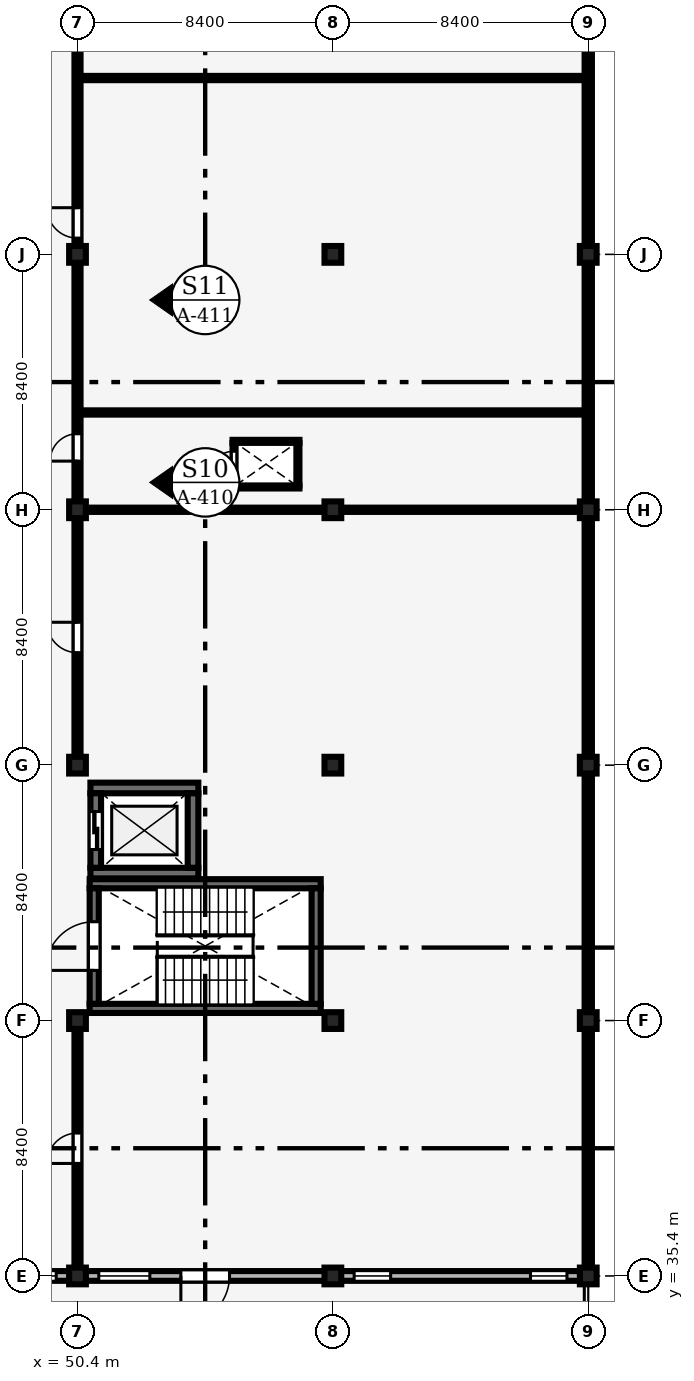
"""IFC4 building model, lengths in metres.
Left out: names, types, materials, properties, quantities, classifications, styles, units other than length and angle.
Written with IfcOpenShell. Run it as: python <this file> out.ifc"""

import sys

from ifc_helpers import new_model, si_unit, direction, frame, frame_2d, origin, origin_2d, place, context, subcontext, project, spatial, rectangle, extrude, element, fill, save


model = new_model("IFC4")
c1 = context("Model", 3, precision=1e-05, world=origin(), true_north=direction((0.0, 1.0)))
c2 = subcontext(c1, "Body", "Model", "MODEL_VIEW")
j1 = project(units=[si_unit("LENGTHUNIT", "METRE"), si_unit("PLANEANGLEUNIT", "RADIAN")], contexts=[c1])
p1 = place(None, origin())
s1 = spatial("IfcSite", under=j1, at=p1, CompositionType="ELEMENT")
p2 = place(p1, origin())
s2 = spatial("IfcBuilding", under=s1, at=p2, CompositionType="ELEMENT")
p3 = place(p2, frame((0.0, 0.0, 9.0)))
s3 = spatial("IfcBuildingStorey", under=s2, at=p3, CompositionType="ELEMENT", Elevation=9.0)
for number, where, z_axis, x_axis in (
    (1, (50.4, 35.4, 0.0), (0.0, 0.0, 1.0), (1.0, 0.0, 0.0)),
    (2, (50.4, 43.8, 0.0), (0.0, 0.0, 1.0), (1.0, 0.0, 0.0)),
    (3, (50.4, 52.2, 0.0), (0.0, 0.0, 1.0), (1.0, 0.0, 0.0)),
    (4, (50.4, 60.6, 0.0), (0.0, 0.0, 1.0), (1.0, 0.0, 0.0)),
    (5, (50.4, 69.0, 0.0), (0.0, 0.0, 1.0), (1.0, 0.0, 0.0)),
    (6, (58.8, 35.4, 0.0), (0.0, 0.0, 1.0), (1.0, 0.0, 0.0)),
    (7, (58.8, 43.8, 0.0), (0.0, 0.0, 1.0), (1.0, 0.0, 0.0)),
    (8, (58.8, 52.2, 0.0), (0.0, 0.0, 1.0), (1.0, 0.0, 0.0)),
    (9, (58.8, 60.6, 0.0), (0.0, 0.0, 1.0), (1.0, 0.0, 0.0)),
    (10, (58.8, 69.0, 0.0), (0.0, 0.0, 1.0), (1.0, 0.0, 0.0)),
    (11, (67.2, 35.4, 0.0), (0.0, 0.0, 1.0), (1.0, 0.0, 0.0)),
    (12, (67.2, 43.8, 0.0), (0.0, 0.0, 1.0), (1.0, 0.0, 0.0)),
    (13, (67.2, 52.2, 0.0), (0.0, 0.0, 1.0), (1.0, 0.0, 0.0)),
    (14, (67.2, 60.6, 0.0), (0.0, 0.0, 1.0), (1.0, 0.0, 0.0)),
    (15, (67.2, 69.0, 0.0), (0.0, 0.0, 1.0), (1.0, 0.0, 0.0)),
):
    element("IfcColumn", number, at=place(p3, frame(where, z_axis=z_axis, x_axis=x_axis)), inside=s3, PredefinedType="COLUMN", context=c2, shape_type="SweptSolid", body=[
        extrude(rectangle(XDim=0.55, YDim=0.55, at=origin_2d()), origin(), (0.0, 0.0, 1.0), 4.2),
    ])
p4 = place(p3, frame((42.25, 35.4, 0.0), z_axis=(0.0, 0.0, 1.0), x_axis=(1.0, 0.0, 0.0)))
e16 = element("IfcWall", 16, at=p4, inside=s3, PredefinedType="SOLIDWALL", context=c2, shape_type="SweptSolid", body=[
    extrude(rectangle(XDim=7.9, YDim=0.32, at=frame_2d((3.95, 0.0))), origin(), (0.0, 0.0, 1.0), 2.96),
])
p5 = place(p4, frame((0.45, 0.0, 0.9)))
e17 = element("IfcOpeningElement", 17, at=p5, cuts=e16, PredefinedType="OPENING", context=c2, shape_type="SweptSolid", body=[
    extrude(rectangle(XDim=1.2, YDim=1.5, at=frame_2d((0.6, 0.75))), frame((0.0, 0.17, 0.0), z_axis=(0.0, -1.0, 0.0), x_axis=(1.0, 0.0, 0.0)), (0.0, 0.0, 1.0), 0.34),
])
p6 = place(p4, frame((6.25, 0.0, 0.9)))
e18 = element("IfcOpeningElement", 18, at=p6, cuts=e16, PredefinedType="OPENING", context=c2, shape_type="SweptSolid", body=[
    extrude(rectangle(XDim=1.2, YDim=1.8, at=frame_2d((0.6, 0.9))), frame((0.0, 0.17, 0.0), z_axis=(0.0, -1.0, 0.0), x_axis=(1.0, 0.0, 0.0)), (0.0, 0.0, 1.0), 0.34),
])
p7 = place(p3, frame((50.65, 35.4, 0.0), z_axis=(0.0, 0.0, 1.0), x_axis=(1.0, 0.0, 0.0)))
e19 = element("IfcWall", 19, at=p7, inside=s3, PredefinedType="SOLIDWALL", context=c2, shape_type="SweptSolid", body=[
    extrude(rectangle(XDim=7.9, YDim=0.32, at=frame_2d((3.95, 0.0))), origin(), (0.0, 0.0, 1.0), 2.91),
])
p8 = place(p7, frame((4.75, 0.0, 0.0), z_axis=(0.0, 0.0, 1.0), x_axis=(-1.0, 0.0, 0.0)))
e20 = element("IfcOpeningElement", 20, at=p8, cuts=e19, PredefinedType="OPENING", context=c2, shape_type="SweptSolid", body=[
    extrude(rectangle(XDim=1.6, YDim=2.3, at=frame_2d((0.8, 1.15))), frame((0.0, 0.17, 0.0), z_axis=(0.0, -1.0, 0.0), x_axis=(1.0, 0.0, 0.0)), (0.0, 0.0, 1.0), 0.34),
])
p9 = place(p7, frame((0.45, 0.0, 0.95)))
e21 = element("IfcOpeningElement", 21, at=p9, cuts=e19, PredefinedType="OPENING", context=c2, shape_type="SweptSolid", body=[
    extrude(rectangle(XDim=1.68, YDim=1.8, at=frame_2d((0.84, 0.9))), frame((0.0, 0.17, 0.0), z_axis=(0.0, -1.0, 0.0), x_axis=(1.0, 0.0, 0.0)), (0.0, 0.0, 1.0), 0.34),
])
p10 = place(p3, frame((59.05, 35.4, 0.0), z_axis=(0.0, 0.0, 1.0), x_axis=(1.0, 0.0, 0.0)))
e22 = element("IfcWall", 22, at=p10, inside=s3, PredefinedType="SOLIDWALL", context=c2, shape_type="SweptSolid", body=[
    extrude(rectangle(XDim=7.9, YDim=0.32, at=frame_2d((3.95, 0.0))), origin(), (0.0, 0.0, 1.0), 2.81),
])
p11 = place(p10, frame((0.45, 0.0, 0.9)))
e23 = element("IfcOpeningElement", 23, at=p11, cuts=e22, PredefinedType="OPENING", context=c2, shape_type="SweptSolid", body=[
    extrude(rectangle(XDim=1.2, YDim=1.5, at=frame_2d((0.6, 0.75))), frame((0.0, 0.17, 0.0), z_axis=(0.0, -1.0, 0.0), x_axis=(1.0, 0.0, 0.0)), (0.0, 0.0, 1.0), 0.34),
])
p12 = place(p10, frame((6.25, 0.0, 0.9)))
e24 = element("IfcOpeningElement", 24, at=p12, cuts=e22, PredefinedType="OPENING", context=c2, shape_type="SweptSolid", body=[
    extrude(rectangle(XDim=1.2, YDim=1.76, at=frame_2d((0.6, 0.88))), frame((0.0, 0.17, 0.0), z_axis=(0.0, -1.0, 0.0), x_axis=(1.0, 0.0, 0.0)), (0.0, 0.0, 1.0), 0.34),
])
p13 = place(p3, frame((67.2, 35.65, 0.0), z_axis=(0.0, 0.0, 1.0), x_axis=(0.0, 1.0, 0.0)))
e25 = element("IfcWall", 25, at=p13, inside=s3, PredefinedType="SOLIDWALL", context=c2, shape_type="SweptSolid", body=[
    extrude(rectangle(XDim=7.9, YDim=0.24, at=frame_2d((3.95, 0.0))), origin(), (0.0, 0.0, 1.0), 1.15),
])
p14 = place(p3, frame((67.2, 44.05, 0.0), z_axis=(0.0, 0.0, 1.0), x_axis=(0.0, 1.0, 0.0)))
e26 = element("IfcWall", 26, at=p14, inside=s3, PredefinedType="SOLIDWALL", context=c2, shape_type="SweptSolid", body=[
    extrude(rectangle(XDim=7.9, YDim=0.24, at=frame_2d((3.95, 0.0))), origin(), (0.0, 0.0, 1.0), 1.15),
])
p15 = place(p3, frame((67.2, 52.45, 0.0), z_axis=(0.0, 0.0, 1.0), x_axis=(0.0, 1.0, 0.0)))
e27 = element("IfcWall", 27, at=p15, inside=s3, PredefinedType="SOLIDWALL", context=c2, shape_type="SweptSolid", body=[
    extrude(rectangle(XDim=7.9, YDim=0.24, at=frame_2d((3.95, 0.0))), origin(), (0.0, 0.0, 1.0), 1.15),
])
for number, where, z_axis, x_axis in (
    (28, (67.2, 60.85, 0.0), (0.0, 0.0, 1.0), (0.0, 1.0, 0.0)),
    (29, (67.2, 69.25, 0.0), (0.0, 0.0, 1.0), (0.0, 1.0, 0.0)),
):
    element("IfcWall", number, at=place(p3, frame(where, z_axis=z_axis, x_axis=x_axis)), inside=s3, PredefinedType="SOLIDWALL", context=c2, shape_type="SweptSolid", body=[
        extrude(rectangle(XDim=7.9, YDim=0.24, at=frame_2d((3.95, 0.0))), origin(), (0.0, 0.0, 1.0), 1.15),
    ])
for number, where, z_axis, x_axis in (
    (30, (50.8, 44.2, 0.0), (0.0, 0.0, 1.0), (1.0, 0.0, 0.0)),
    (31, (50.8, 48.3, 0.0), (0.0, 0.0, 1.0), (1.0, 0.0, 0.0)),
):
    element("IfcWall", number, at=place(p3, frame(where, z_axis=z_axis, x_axis=x_axis)), inside=s3, PredefinedType="SHEAR", context=c2, shape_type="SweptSolid", body=[
        extrude(rectangle(XDim=7.6, YDim=0.3, at=frame_2d((3.8, 0.0))), origin(), (0.0, 0.0, 1.0), 4.025),
    ])
p16 = place(p3, frame((50.95, 44.35, 0.0), z_axis=(0.0, 0.0, 1.0), x_axis=(0.0, 1.0, 0.0)))
e32 = element("IfcWall", 32, at=p16, inside=s3, PredefinedType="SHEAR", context=c2, shape_type="SweptSolid", body=[
    extrude(rectangle(XDim=3.8, YDim=0.3, at=frame_2d((1.9, 0.0))), origin(), (0.0, 0.0, 1.0), 4.025),
])
p17 = place(p16, frame((1.1, 0.0, 0.0)))
e33 = element("IfcOpeningElement", 33, at=p17, cuts=e32, PredefinedType="OPENING", context=c2, shape_type="SweptSolid", body=[
    extrude(rectangle(XDim=1.6, YDim=2.2, at=frame_2d((0.8, 1.1))), frame((0.0, 0.16, 0.0), z_axis=(0.0, -1.0, 0.0), x_axis=(1.0, 0.0, 0.0)), (0.0, 0.0, 1.0), 0.32),
])
p18 = place(p3, frame((58.25, 44.35, 0.0), z_axis=(0.0, 0.0, 1.0), x_axis=(0.0, 1.0, 0.0)))
e34 = element("IfcWall", 34, at=p18, inside=s3, PredefinedType="SHEAR", context=c2, shape_type="SweptSolid", body=[
    extrude(rectangle(XDim=3.8, YDim=0.3, at=frame_2d((1.9, 0.0))), origin(), (0.0, 0.0, 1.0), 4.025),
])
for number, where, z_axis, x_axis in (
    (35, (50.825, 48.65, 0.0), (0.0, 0.0, 1.0), (1.0, 0.0, 0.0)),
    (36, (50.825, 51.45, 0.0), (0.0, 0.0, 1.0), (1.0, 0.0, 0.0)),
):
    element("IfcWall", number, at=place(p3, frame(where, z_axis=z_axis, x_axis=x_axis)), inside=s3, PredefinedType="SHEAR", context=c2, shape_type="SweptSolid", body=[
        extrude(rectangle(XDim=3.55, YDim=0.35, at=frame_2d((1.775, 0.0))), origin(), (0.0, 0.0, 1.0), 3.92),
    ])
p19 = place(p3, frame((51.0, 48.825, 0.0), z_axis=(0.0, 0.0, 1.0), x_axis=(0.0, 1.0, 0.0)))
e37 = element("IfcWall", 37, at=p19, inside=s3, PredefinedType="SHEAR", context=c2, shape_type="SweptSolid", body=[
    extrude(rectangle(XDim=2.45, YDim=0.35, at=frame_2d((1.225, 0.0))), origin(), (0.0, 0.0, 1.0), 3.92),
])
p20 = place(p19, frame((0.6, 0.0, 0.0)))
e38 = element("IfcOpeningElement", 38, at=p20, cuts=e37, PredefinedType="OPENING", context=c2, shape_type="SweptSolid", body=[
    extrude(rectangle(XDim=1.25, YDim=2.25, at=frame_2d((0.625, 1.125))), frame((0.0, 0.185, 0.0), z_axis=(0.0, -1.0, 0.0), x_axis=(1.0, 0.0, 0.0)), (0.0, 0.0, 1.0), 0.37),
])
p21 = place(p3, frame((54.2, 48.825, 0.0), z_axis=(0.0, 0.0, 1.0), x_axis=(0.0, 1.0, 0.0)))
e39 = element("IfcWall", 39, at=p21, inside=s3, PredefinedType="SHEAR", context=c2, shape_type="SweptSolid", body=[
    extrude(rectangle(XDim=2.45, YDim=0.35, at=frame_2d((1.225, 0.0))), origin(), (0.0, 0.0, 1.0), 3.92),
])
for number, where, z_axis, x_axis in (
    (40, (55.5, 61.35, 0.0), (0.0, 0.0, 1.0), (1.0, 0.0, 0.0)),
    (41, (55.5, 62.85, 0.0), (0.0, 0.0, 1.0), (1.0, 0.0, 0.0)),
):
    element("IfcWall", number, at=place(p3, frame(where, z_axis=z_axis, x_axis=x_axis)), inside=s3, PredefinedType="PARTITIONING", context=c2, shape_type="SweptSolid", body=[
        extrude(rectangle(XDim=2.2, YDim=0.1, at=frame_2d((1.1, 0.0))), origin(), (0.0, 0.0, 1.0), 3.9),
    ])
p22 = place(p3, frame((55.55, 61.4, 0.0), z_axis=(0.0, 0.0, 1.0), x_axis=(0.0, 1.0, 0.0)))
e42 = element("IfcWall", 42, at=p22, inside=s3, PredefinedType="PARTITIONING", context=c2, shape_type="SweptSolid", body=[
    extrude(rectangle(XDim=1.4, YDim=0.1, at=frame_2d((0.7, 0.0))), origin(), (0.0, 0.0, 1.0), 3.9),
])
p23 = place(p22, frame((0.275, 0.0, 0.0)))
e43 = element("IfcOpeningElement", 43, at=p23, cuts=e42, PredefinedType="OPENING", context=c2, shape_type="SweptSolid", body=[
    extrude(rectangle(XDim=0.85, YDim=2.05, at=frame_2d((0.425, 1.025))), frame((0.0, 0.06, 0.0), z_axis=(0.0, -1.0, 0.0), x_axis=(1.0, 0.0, 0.0)), (0.0, 0.0, 1.0), 0.12),
])
p24 = place(p3, frame((57.65, 61.4, 0.0), z_axis=(0.0, 0.0, 1.0), x_axis=(0.0, 1.0, 0.0)))
e44 = element("IfcWall", 44, at=p24, inside=s3, PredefinedType="PARTITIONING", context=c2, shape_type="SweptSolid", body=[
    extrude(rectangle(XDim=1.4, YDim=0.1, at=frame_2d((0.7, 0.0))), origin(), (0.0, 0.0, 1.0), 3.9),
])
p25 = place(p3, frame((50.4, 35.565, 0.0), z_axis=(0.0, 0.0, 1.0), x_axis=(0.0, 1.0, 0.0)))
e45 = element("IfcWall", 45, at=p25, inside=s3, PredefinedType="PARTITIONING", context=c2, shape_type="SweptSolid", body=[
    extrude(rectangle(XDim=7.95, YDim=0.2, at=frame_2d((3.975, 0.0))), origin(), (0.0, 0.0, 1.0), 3.26),
])
p26 = place(p25, frame((3.535, 0.0, 0.0)))
e46 = element("IfcOpeningElement", 46, at=p26, cuts=e45, PredefinedType="OPENING", context=c2, shape_type="SweptSolid", body=[
    extrude(rectangle(XDim=1.0, YDim=2.15, at=frame_2d((0.5, 1.075))), frame((0.0, 0.11, 0.0), z_axis=(0.0, -1.0, 0.0), x_axis=(1.0, 0.0, 0.0)), (0.0, 0.0, 1.0), 0.22),
])
p27 = place(p3, frame((50.505, 60.6, 0.0), z_axis=(0.0, 0.0, 1.0), x_axis=(1.0, 0.0, 0.0)))
e47 = element("IfcWall", 47, at=p27, inside=s3, PredefinedType="PARTITIONING", context=c2, shape_type="SweptSolid", body=[
    extrude(rectangle(XDim=8.01, YDim=0.14, at=frame_2d((4.005, 0.0))), origin(), (0.0, 0.0, 1.0), 2.91),
])
p28 = place(p3, frame((59.085, 60.6, 0.0), z_axis=(0.0, 0.0, 1.0), x_axis=(1.0, 0.0, 0.0)))
e48 = element("IfcWall", 48, at=p28, inside=s3, PredefinedType="PARTITIONING", context=c2, shape_type="SweptSolid", body=[
    extrude(rectangle(XDim=7.99, YDim=0.14, at=frame_2d((3.995, 0.0))), origin(), (0.0, 0.0, 1.0), 2.81),
])
for number, where, z_axis, x_axis in (
    (49, (50.505, 63.8, 0.0), (0.0, 0.0, 1.0), (1.0, 0.0, 0.0)),
    (50, (50.505, 74.8, 0.0), (0.0, 0.0, 1.0), (1.0, 0.0, 0.0)),
):
    element("IfcWall", number, at=place(p3, frame(where, z_axis=z_axis, x_axis=x_axis)), inside=s3, PredefinedType="PARTITIONING", context=c2, shape_type="SweptSolid", body=[
        extrude(rectangle(XDim=16.57, YDim=0.14, at=frame_2d((8.285, 0.0))), origin(), (0.0, 0.0, 1.0), 3.51),
    ])
p29 = place(p3, frame((50.4, 52.485, 0.0), z_axis=(0.0, 0.0, 1.0), x_axis=(0.0, 1.0, 0.0)))
e51 = element("IfcWall", 51, at=p29, inside=s3, PredefinedType="PARTITIONING", context=c2, shape_type="SweptSolid", body=[
    extrude(rectangle(XDim=7.83, YDim=0.2, at=frame_2d((3.915, 0.0))), origin(), (0.0, 0.0, 1.0), 3.26),
])
p30 = place(p29, frame((3.415, 0.0, 0.0)))
e52 = element("IfcOpeningElement", 52, at=p30, cuts=e51, PredefinedType="OPENING", context=c2, shape_type="SweptSolid", body=[
    extrude(rectangle(XDim=1.0, YDim=2.15, at=frame_2d((0.5, 1.075))), frame((0.0, 0.11, 0.0), z_axis=(0.0, -1.0, 0.0), x_axis=(1.0, 0.0, 0.0)), (0.0, 0.0, 1.0), 0.22),
])
p31 = place(p3, frame((50.4, 60.885, 0.0), z_axis=(0.0, 0.0, 1.0), x_axis=(0.0, 1.0, 0.0)))
e53 = element("IfcWall", 53, at=p31, inside=s3, PredefinedType="PARTITIONING", context=c2, shape_type="SweptSolid", body=[
    extrude(rectangle(XDim=7.83, YDim=0.2, at=frame_2d((3.915, 0.0))), origin(), (0.0, 0.0, 1.0), 3.21),
])
p32 = place(p31, frame((1.315, 0.0, 0.0)))
e54 = element("IfcOpeningElement", 54, at=p32, cuts=e53, PredefinedType="OPENING", context=c2, shape_type="SweptSolid", body=[
    extrude(rectangle(XDim=0.9, YDim=2.1, at=frame_2d((0.45, 1.05))), frame((0.0, 0.11, 0.0), z_axis=(0.0, -1.0, 0.0), x_axis=(1.0, 0.0, 0.0)), (0.0, 0.0, 1.0), 0.22),
])
p33 = place(p3, frame((50.4, 69.285, 0.0), z_axis=(0.0, 0.0, 1.0), x_axis=(0.0, 1.0, 0.0)))
e55 = element("IfcWall", 55, at=p33, inside=s3, PredefinedType="PARTITIONING", context=c2, shape_type="SweptSolid", body=[
    extrude(rectangle(XDim=7.83, YDim=0.2, at=frame_2d((3.915, 0.0))), origin(), (0.0, 0.0, 1.0), 3.16),
])
p34 = place(p33, frame((0.25, 0.0, 0.0)))
e56 = element("IfcOpeningElement", 56, at=p34, cuts=e55, PredefinedType="OPENING", context=c2, shape_type="SweptSolid", body=[
    extrude(rectangle(XDim=1.0, YDim=2.15, at=frame_2d((0.5, 1.075))), frame((0.0, 0.11, 0.0), z_axis=(0.0, -1.0, 0.0), x_axis=(1.0, 0.0, 0.0)), (0.0, 0.0, 1.0), 0.22),
])
p35 = place(p6, origin())
e57 = element("IfcWindow", 57, at=p35, inside=s3, PartitioningType="SINGLE_PANEL", PredefinedType="WINDOW", context=c2, shape_type="SweptSolid", body=[
    extrude(rectangle(XDim=1.2, YDim=1.8, at=frame_2d((0.6, 0.9))), frame((0.0, 0.03, 0.0), z_axis=(0.0, -1.0, 0.0), x_axis=(1.0, 0.0, 0.0)), (0.0, 0.0, 1.0), 0.06),
])
fill(e18, e57)
p36 = place(p8, origin())
e58 = element("IfcDoor", 58, at=p36, inside=s3, OperationType="DOUBLE_DOOR_SINGLE_SWING", PredefinedType="DOOR", context=c2, shape_type="SweptSolid", body=[
    extrude(rectangle(XDim=1.6, YDim=2.3, at=frame_2d((0.8, 1.15))), frame((0.0, 0.025, 0.0), z_axis=(0.0, -1.0, 0.0), x_axis=(1.0, 0.0, 0.0)), (0.0, 0.0, 1.0), 0.05),
])
fill(e20, e58)
p37 = place(p9, origin())
e59 = element("IfcWindow", 59, at=p37, inside=s3, PartitioningType="SINGLE_PANEL", PredefinedType="WINDOW", context=c2, shape_type="SweptSolid", body=[
    extrude(rectangle(XDim=1.68, YDim=1.8, at=frame_2d((0.84, 0.9))), frame((0.0, 0.03, 0.0), z_axis=(0.0, -1.0, 0.0), x_axis=(1.0, 0.0, 0.0)), (0.0, 0.0, 1.0), 0.06),
])
fill(e21, e59)
p38 = place(p11, origin())
e60 = element("IfcWindow", 60, at=p38, inside=s3, PartitioningType="SINGLE_PANEL", PredefinedType="WINDOW", context=c2, shape_type="SweptSolid", body=[
    extrude(rectangle(XDim=1.2, YDim=1.5, at=frame_2d((0.6, 0.75))), frame((0.0, 0.03, 0.0), z_axis=(0.0, -1.0, 0.0), x_axis=(1.0, 0.0, 0.0)), (0.0, 0.0, 1.0), 0.06),
])
fill(e23, e60)
p39 = place(p12, origin())
e61 = element("IfcWindow", 61, at=p39, inside=s3, PartitioningType="SINGLE_PANEL", PredefinedType="WINDOW", context=c2, shape_type="SweptSolid", body=[
    extrude(rectangle(XDim=1.2, YDim=1.76, at=frame_2d((0.6, 0.88))), frame((0.0, 0.03, 0.0), z_axis=(0.0, -1.0, 0.0), x_axis=(1.0, 0.0, 0.0)), (0.0, 0.0, 1.0), 0.06),
])
fill(e24, e61)
p40 = place(p17, origin())
e62 = element("IfcDoor", 62, at=p40, inside=s3, OperationType="DOUBLE_DOOR_SINGLE_SWING", PredefinedType="DOOR", context=c2, shape_type="SweptSolid", body=[
    extrude(rectangle(XDim=1.6, YDim=2.2, at=frame_2d((0.8, 1.1))), frame((0.0, 0.025, 0.0), z_axis=(0.0, -1.0, 0.0), x_axis=(1.0, 0.0, 0.0)), (0.0, 0.0, 1.0), 0.05),
])
fill(e33, e62)
p41 = place(p20, origin())
e63 = element("IfcDoor", 63, at=p41, inside=s3, OperationType="DOUBLE_DOOR_SLIDING", PredefinedType="DOOR", context=c2, shape_type="SweptSolid", body=[
    extrude(rectangle(XDim=1.25, YDim=2.25, at=frame_2d((0.625, 1.125))), frame((0.0, 0.025, 0.0), z_axis=(0.0, -1.0, 0.0), x_axis=(1.0, 0.0, 0.0)), (0.0, 0.0, 1.0), 0.05),
])
fill(e38, e63)
p42 = place(p23, origin())
e64 = element("IfcDoor", 64, at=p42, inside=s3, OperationType="SINGLE_SWING_LEFT", PredefinedType="DOOR", context=c2, shape_type="SweptSolid", body=[
    extrude(rectangle(XDim=0.85, YDim=2.05, at=frame_2d((0.425, 1.025))), frame((0.0, 0.025, 0.0), z_axis=(0.0, -1.0, 0.0), x_axis=(1.0, 0.0, 0.0)), (0.0, 0.0, 1.0), 0.05),
])
fill(e43, e64)
p43 = place(p26, origin())
e65 = element("IfcDoor", 65, at=p43, inside=s3, OperationType="SINGLE_SWING_LEFT", PredefinedType="DOOR", context=c2, shape_type="SweptSolid", body=[
    extrude(rectangle(XDim=1.0, YDim=2.15, at=frame_2d((0.5, 1.075))), frame((0.0, 0.025, 0.0), z_axis=(0.0, -1.0, 0.0), x_axis=(1.0, 0.0, 0.0)), (0.0, 0.0, 1.0), 0.05),
])
fill(e46, e65)
p44 = place(p30, origin())
e66 = element("IfcDoor", 66, at=p44, inside=s3, OperationType="SINGLE_SWING_RIGHT", PredefinedType="DOOR", context=c2, shape_type="SweptSolid", body=[
    extrude(rectangle(XDim=1.0, YDim=2.15, at=frame_2d((0.5, 1.075))), frame((0.0, 0.025, 0.0), z_axis=(0.0, -1.0, 0.0), x_axis=(1.0, 0.0, 0.0)), (0.0, 0.0, 1.0), 0.05),
])
fill(e52, e66)
p45 = place(p32, origin())
e67 = element("IfcDoor", 67, at=p45, inside=s3, OperationType="SINGLE_SWING_LEFT", PredefinedType="DOOR", context=c2, shape_type="SweptSolid", body=[
    extrude(rectangle(XDim=0.9, YDim=2.1, at=frame_2d((0.45, 1.05))), frame((0.0, 0.025, 0.0), z_axis=(0.0, -1.0, 0.0), x_axis=(1.0, 0.0, 0.0)), (0.0, 0.0, 1.0), 0.05),
])
fill(e54, e67)
p46 = place(p34, origin())
e68 = element("IfcDoor", 68, at=p46, inside=s3, OperationType="SINGLE_SWING_RIGHT", PredefinedType="DOOR", context=c2, shape_type="SweptSolid", body=[
    extrude(rectangle(XDim=1.0, YDim=2.15, at=frame_2d((0.5, 1.075))), frame((0.0, 0.025, 0.0), z_axis=(0.0, -1.0, 0.0), x_axis=(1.0, 0.0, 0.0)), (0.0, 0.0, 1.0), 0.05),
])
fill(e56, e68)
save(model, sys.argv[1])
